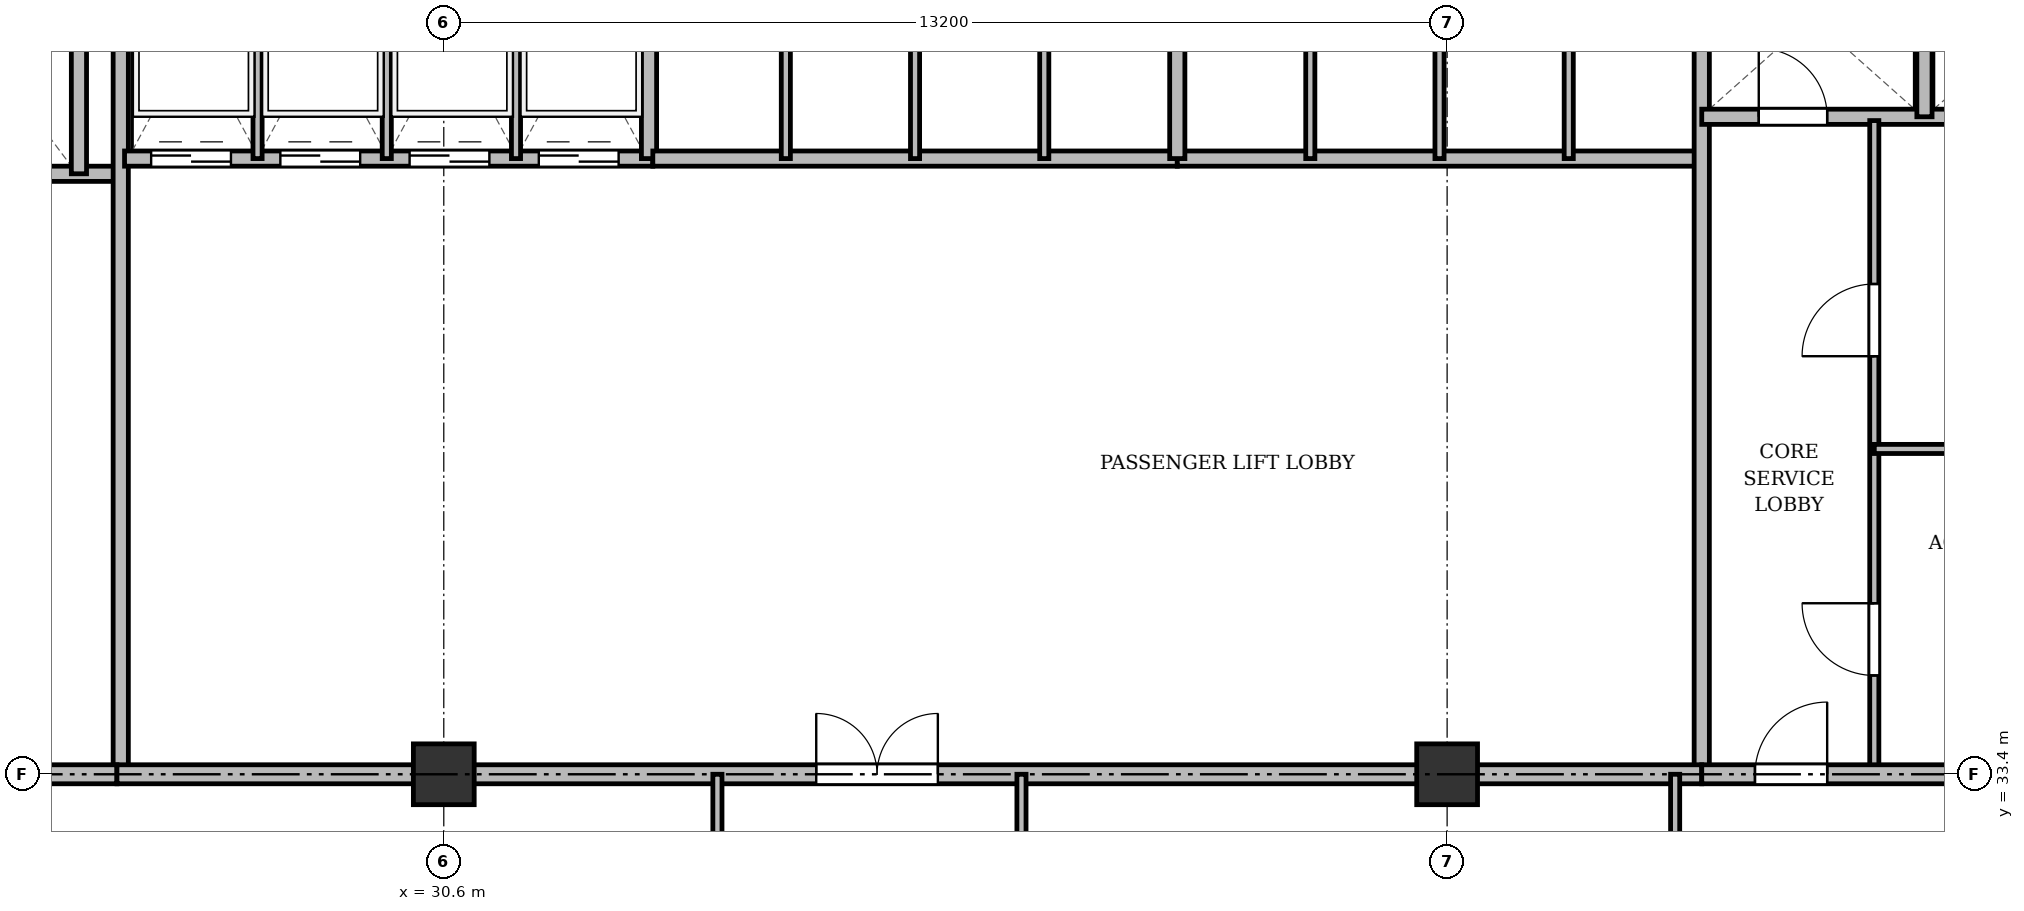
"""IFC4 building model, lengths in metres.
Left out: names, types, materials, properties, quantities, classifications, styles, units other than length and angle.
Written with IfcOpenShell. Run it as: python <this file> out.ifc"""

import sys

from ifc_helpers import new_model, si_unit, direction, frame, frame_2d, origin, origin_2d, place, context, subcontext, project, spatial, rectangle, extrude, source, transform, mapped, element, fill, save


model = new_model("IFC4")
c1 = context("Model", 3, precision=1e-05, world=origin(), true_north=direction((0.0, 1.0)))
c2 = subcontext(c1, "Body", "Model", "MODEL_VIEW")
j1 = project(units=[si_unit("LENGTHUNIT", "METRE"), si_unit("PLANEANGLEUNIT", "RADIAN")], contexts=[c1])
p1 = place(None, origin())
s1 = spatial("IfcSite", under=j1, at=p1, CompositionType="ELEMENT")
p2 = place(p1, origin())
s2 = spatial("IfcBuilding", under=s1, at=p2, CompositionType="ELEMENT")
p3 = place(p2, frame((0.0, 0.0, 103.3)))
s3 = spatial("IfcBuildingStorey", under=s2, at=p3, CompositionType="ELEMENT", Elevation=103.3)
m1 = source(origin(), c2, "Body", "SweptSolid", [
    extrude(rectangle(XDim=0.8, YDim=0.8, at=origin_2d()), origin(), (0.0, 0.0, 1.0), 3.6),
])
for number, where, z_axis, x_axis in (
    (1, (30.6, 33.4, 0.0), (0.0, 0.0, 1.0), (1.0, 0.0, 0.0)),
    (2, (43.8, 33.4, 0.0), (0.0, 0.0, 1.0), (1.0, 0.0, 0.0)),
):
    element("IfcColumn", number, at=place(p3, frame(where, z_axis=z_axis, x_axis=x_axis)), inside=s3, PredefinedType="COLUMN", context=c2, shape_type="MappedRepresentation", body=[
        mapped(m1, transform((0.0, 0.0, 0.0), x_axis=(1.0, 0.0, 0.0), y_axis=(0.0, 1.0, 0.0), z_axis=(0.0, 0.0, 1.0), scale=1.0)),
    ])
p4 = place(p3, frame((19.55, 41.3, 0.0), z_axis=(0.0, 0.0, 1.0), x_axis=(1.0, 0.0, 0.0)))
e3 = element("IfcWall", 3, at=p4, inside=s3, PredefinedType="SOLIDWALL", context=c2, shape_type="SweptSolid", body=[
    extrude(rectangle(XDim=6.75, YDim=0.2, at=frame_2d((3.375, 0.0))), origin(), (0.0, 0.0, 1.0), 3.34),
])
p5 = place(p4, frame((1.7, 0.0, 0.0)))
e4 = element("IfcOpeningElement", 4, at=p5, cuts=e3, PredefinedType="OPENING", context=c2, shape_type="SweptSolid", body=[
    extrude(rectangle(XDim=1.1, YDim=2.15, at=frame_2d((0.55, 1.075))), frame((0.0, 0.11, 0.0), z_axis=(0.0, -1.0, 0.0), x_axis=(1.0, 0.0, 0.0)), (0.0, 0.0, 1.0), 0.22),
])
p6 = place(p4, frame((4.4, 0.0, 0.0)))
e5 = element("IfcOpeningElement", 5, at=p6, cuts=e3, PredefinedType="OPENING", context=c2, shape_type="SweptSolid", body=[
    extrude(rectangle(XDim=1.1, YDim=2.15, at=frame_2d((0.55, 1.075))), frame((0.0, 0.11, 0.0), z_axis=(0.0, -1.0, 0.0), x_axis=(1.0, 0.0, 0.0)), (0.0, 0.0, 1.0), 0.22),
])
p7 = place(p3, frame((25.8, 41.3, 0.0), z_axis=(0.0, 0.0, 1.0), x_axis=(0.0, 1.0, 0.0)))
e6 = element("IfcWall", 6, at=p7, inside=s3, PredefinedType="SOLIDWALL", context=c2, shape_type="SweptSolid", body=[
    extrude(rectangle(XDim=3.4, YDim=0.2, at=frame_2d((1.7, 0.0))), origin(), (0.0, 0.0, 1.0), 3.34),
])
p8 = place(p3, frame((26.35, 33.4, 0.0), z_axis=(0.0, 0.0, 1.0), x_axis=(0.0, 1.0, 0.0)))
e7 = element("IfcWall", 7, at=p8, inside=s3, PredefinedType="SOLIDWALL", context=c2, shape_type="SweptSolid", body=[
    extrude(rectangle(XDim=11.3, YDim=0.2, at=frame_2d((5.65, 0.0))), origin(), (0.0, 0.0, 1.0), 2.752),
])
p9 = place(p3, frame((19.5, 33.4, 0.0), z_axis=(0.0, 0.0, 1.0), x_axis=(1.0, 0.0, 0.0)))
e8 = element("IfcWall", 8, at=p9, inside=s3, PredefinedType="PARTITIONING", context=c2, shape_type="SweptSolid", body=[
    extrude(rectangle(XDim=6.8, YDim=0.25, at=frame_2d((3.4, 0.0))), origin(), (0.0, 0.0, 1.0), 2.752),
])
p10 = place(p9, frame((0.75, 0.0, 0.0)))
e9 = element("IfcOpeningElement", 9, at=p10, cuts=e8, PredefinedType="OPENING", context=c2, shape_type="SweptSolid", body=[
    extrude(rectangle(XDim=1.6, YDim=2.2, at=frame_2d((0.8, 1.1))), frame((0.0, 0.135, 0.0), z_axis=(0.0, -1.0, 0.0), x_axis=(1.0, 0.0, 0.0)), (0.0, 0.0, 1.0), 0.27),
])
p11 = place(p3, frame((26.4, 41.5, 0.0), z_axis=(0.0, 0.0, 1.0), x_axis=(1.0, 0.0, 0.0)))
e10 = element("IfcWall", 10, at=p11, inside=s3, PredefinedType="SOLIDWALL", context=c2, shape_type="SweptSolid", body=[
    extrude(rectangle(XDim=6.95, YDim=0.2, at=frame_2d((3.475, 0.0))), origin(), (0.0, 0.0, 1.0), 3.34),
])
p12 = place(p11, frame((0.35, 0.0, 0.0)))
e11 = element("IfcOpeningElement", 11, at=p12, cuts=e10, PredefinedType="OPENING", context=c2, shape_type="SweptSolid", body=[
    extrude(rectangle(XDim=1.05, YDim=2.15, at=frame_2d((0.525, 1.075))), frame((0.0, 0.11, 0.0), z_axis=(0.0, -1.0, 0.0), x_axis=(1.0, 0.0, 0.0)), (0.0, 0.0, 1.0), 0.22),
])
p13 = place(p11, frame((2.05, 0.0, 0.0)))
e12 = element("IfcOpeningElement", 12, at=p13, cuts=e10, PredefinedType="OPENING", context=c2, shape_type="SweptSolid", body=[
    extrude(rectangle(XDim=1.05, YDim=2.15, at=frame_2d((0.525, 1.075))), frame((0.0, 0.11, 0.0), z_axis=(0.0, -1.0, 0.0), x_axis=(1.0, 0.0, 0.0)), (0.0, 0.0, 1.0), 0.22),
])
p14 = place(p11, frame((3.75, 0.0, 0.0)))
e13 = element("IfcOpeningElement", 13, at=p14, cuts=e10, PredefinedType="OPENING", context=c2, shape_type="SweptSolid", body=[
    extrude(rectangle(XDim=1.05, YDim=2.15, at=frame_2d((0.525, 1.075))), frame((0.0, 0.11, 0.0), z_axis=(0.0, -1.0, 0.0), x_axis=(1.0, 0.0, 0.0)), (0.0, 0.0, 1.0), 0.22),
])
p15 = place(p11, frame((5.45, 0.0, 0.0)))
e14 = element("IfcOpeningElement", 14, at=p15, cuts=e10, PredefinedType="OPENING", context=c2, shape_type="SweptSolid", body=[
    extrude(rectangle(XDim=1.05, YDim=2.15, at=frame_2d((0.525, 1.075))), frame((0.0, 0.11, 0.0), z_axis=(0.0, -1.0, 0.0), x_axis=(1.0, 0.0, 0.0)), (0.0, 0.0, 1.0), 0.22),
])
p16 = place(p3, frame((33.3, 41.5, 0.0), z_axis=(0.0, 0.0, 1.0), x_axis=(0.0, 1.0, 0.0)))
e15 = element("IfcWall", 15, at=p16, inside=s3, PredefinedType="SOLIDWALL", context=c2, shape_type="SweptSolid", body=[
    extrude(rectangle(XDim=3.2, YDim=0.2, at=frame_2d((1.6, 0.0))), origin(), (0.0, 0.0, 1.0), 3.34),
])
for number, where, z_axis, x_axis in (
    (16, (28.15, 41.5, 0.0), (0.0, 0.0, 1.0), (0.0, 1.0, 0.0)),
    (17, (29.85, 41.5, 0.0), (0.0, 0.0, 1.0), (0.0, 1.0, 0.0)),
    (18, (31.55, 41.5, 0.0), (0.0, 0.0, 1.0), (0.0, 1.0, 0.0)),
):
    element("IfcWall", number, at=place(p3, frame(where, z_axis=z_axis, x_axis=x_axis)), inside=s3, PredefinedType="PARTITIONING", context=c2, shape_type="SweptSolid", body=[
        extrude(rectangle(XDim=3.2, YDim=0.12, at=frame_2d((1.6, 0.0))), origin(), (0.0, 0.0, 1.0), 3.34),
    ])
p17 = place(p3, frame((33.35, 41.5, 0.0), z_axis=(0.0, 0.0, 1.0), x_axis=(1.0, 0.0, 0.0)))
e19 = element("IfcWall", 19, at=p17, inside=s3, PredefinedType="SOLIDWALL", context=c2, shape_type="SweptSolid", body=[
    extrude(rectangle(XDim=6.9, YDim=0.2, at=frame_2d((3.45, 0.0))), origin(), (0.0, 0.0, 1.0), 3.34),
])
for number, where, z_axis, x_axis in (
    (20, (35.1, 41.5, 0.0), (0.0, 0.0, 1.0), (0.0, 1.0, 0.0)),
    (21, (36.8, 41.5, 0.0), (0.0, 0.0, 1.0), (0.0, 1.0, 0.0)),
    (22, (38.5, 41.5, 0.0), (0.0, 0.0, 1.0), (0.0, 1.0, 0.0)),
):
    element("IfcWall", number, at=place(p3, frame(where, z_axis=z_axis, x_axis=x_axis)), inside=s3, PredefinedType="PARTITIONING", context=c2, shape_type="SweptSolid", body=[
        extrude(rectangle(XDim=3.2, YDim=0.12, at=frame_2d((1.6, 0.0))), origin(), (0.0, 0.0, 1.0), 3.34),
    ])
p18 = place(p3, frame((40.25, 41.5, 0.0), z_axis=(0.0, 0.0, 1.0), x_axis=(1.0, 0.0, 0.0)))
e23 = element("IfcWall", 23, at=p18, inside=s3, PredefinedType="SOLIDWALL", context=c2, shape_type="SweptSolid", body=[
    extrude(rectangle(XDim=6.9, YDim=0.2, at=frame_2d((3.45, 0.0))), origin(), (0.0, 0.0, 1.0), 2.84),
])
p19 = place(p3, frame((40.25, 41.5, 0.0), z_axis=(0.0, 0.0, 1.0), x_axis=(0.0, 1.0, 0.0)))
e24 = element("IfcWall", 24, at=p19, inside=s3, PredefinedType="SOLIDWALL", context=c2, shape_type="SweptSolid", body=[
    extrude(rectangle(XDim=3.2, YDim=0.2, at=frame_2d((1.6, 0.0))), origin(), (0.0, 0.0, 1.0), 3.34),
])
p20 = place(p3, frame((42.0, 41.5, 0.0), z_axis=(0.0, 0.0, 1.0), x_axis=(0.0, 1.0, 0.0)))
e25 = element("IfcWall", 25, at=p20, inside=s3, PredefinedType="PARTITIONING", context=c2, shape_type="SweptSolid", body=[
    extrude(rectangle(XDim=3.2, YDim=0.12, at=frame_2d((1.6, 0.0))), origin(), (0.0, 0.0, 1.0), 3.34),
])
p21 = place(p3, frame((43.7, 41.5, 0.0), z_axis=(0.0, 0.0, 1.0), x_axis=(0.0, 1.0, 0.0)))
e26 = element("IfcWall", 26, at=p21, inside=s3, PredefinedType="PARTITIONING", context=c2, shape_type="SweptSolid", body=[
    extrude(rectangle(XDim=3.2, YDim=0.12, at=frame_2d((1.6, 0.0))), origin(), (0.0, 0.0, 1.0), 2.84),
])
p22 = place(p3, frame((45.4, 41.5, 0.0), z_axis=(0.0, 0.0, 1.0), x_axis=(0.0, 1.0, 0.0)))
e27 = element("IfcWall", 27, at=p22, inside=s3, PredefinedType="PARTITIONING", context=c2, shape_type="SweptSolid", body=[
    extrude(rectangle(XDim=3.2, YDim=0.12, at=frame_2d((1.6, 0.0))), origin(), (0.0, 0.0, 1.0), 3.34),
])
p23 = place(p3, frame((47.15, 33.4, 0.0), z_axis=(0.0, 0.0, 1.0), x_axis=(0.0, 1.0, 0.0)))
e28 = element("IfcWall", 28, at=p23, inside=s3, PredefinedType="SOLIDWALL", context=c2, shape_type="SweptSolid", body=[
    extrude(rectangle(XDim=11.3, YDim=0.2, at=frame_2d((5.65, 0.0))), origin(), (0.0, 0.0, 1.0), 2.752),
])
p24 = place(p3, frame((26.3, 33.4, 0.0), z_axis=(0.0, 0.0, 1.0), x_axis=(1.0, 0.0, 0.0)))
e29 = element("IfcWall", 29, at=p24, inside=s3, PredefinedType="PARTITIONING", context=c2, shape_type="SweptSolid", body=[
    extrude(rectangle(XDim=20.85, YDim=0.25, at=frame_2d((10.425, 0.0))), origin(), (0.0, 0.0, 1.0), 2.752),
])
p25 = place(p24, frame((9.2, 0.0, 0.0)))
e30 = element("IfcOpeningElement", 30, at=p25, cuts=e29, PredefinedType="OPENING", context=c2, shape_type="SweptSolid", body=[
    extrude(rectangle(XDim=1.6, YDim=2.2, at=frame_2d((0.8, 1.1))), frame((0.0, 0.135, 0.0), z_axis=(0.0, -1.0, 0.0), x_axis=(1.0, 0.0, 0.0)), (0.0, 0.0, 1.0), 0.27),
])
p26 = place(p3, frame((47.15, 42.05, 0.0), z_axis=(0.0, 0.0, 1.0), x_axis=(1.0, 0.0, 0.0)))
e31 = element("IfcWall", 31, at=p26, inside=s3, PredefinedType="SOLIDWALL", context=c2, shape_type="SweptSolid", body=[
    extrude(rectangle(XDim=7.85, YDim=0.2, at=frame_2d((3.925, 0.0))), origin(), (0.0, 0.0, 1.0), 2.84),
])
p27 = place(p26, frame((0.75, 0.0, 0.0)))
e32 = element("IfcOpeningElement", 32, at=p27, cuts=e31, PredefinedType="OPENING", context=c2, shape_type="SweptSolid", body=[
    extrude(rectangle(XDim=0.9, YDim=2.1, at=frame_2d((0.45, 1.05))), frame((0.0, 0.11, 0.0), z_axis=(0.0, -1.0, 0.0), x_axis=(1.0, 0.0, 0.0)), (0.0, 0.0, 1.0), 0.22),
])
p28 = place(p26, frame((3.85, 0.0, 0.0)))
e33 = element("IfcOpeningElement", 33, at=p28, cuts=e31, PredefinedType="OPENING", context=c2, shape_type="SweptSolid", body=[
    extrude(rectangle(XDim=0.9, YDim=2.1, at=frame_2d((0.45, 1.05))), frame((0.0, 0.11, 0.0), z_axis=(0.0, -1.0, 0.0), x_axis=(1.0, 0.0, 0.0)), (0.0, 0.0, 1.0), 0.22),
])
p29 = place(p3, frame((50.08, 42.05, 0.0), z_axis=(0.0, 0.0, 1.0), x_axis=(0.0, 1.0, 0.0)))
e34 = element("IfcWall", 34, at=p29, inside=s3, PredefinedType="SOLIDWALL", context=c2, shape_type="SweptSolid", body=[
    extrude(rectangle(XDim=2.65, YDim=0.2, at=frame_2d((1.325, 0.0))), origin(), (0.0, 0.0, 1.0), 3.34),
])
p30 = place(p3, frame((49.42, 33.4, 0.0), z_axis=(0.0, 0.0, 1.0), x_axis=(0.0, 1.0, 0.0)))
e35 = element("IfcWall", 35, at=p30, inside=s3, PredefinedType="PARTITIONING", context=c2, shape_type="SweptSolid", body=[
    extrude(rectangle(XDim=8.6, YDim=0.12, at=frame_2d((4.3, 0.0))), origin(), (0.0, 0.0, 1.0), 2.752),
])
p31 = place(p30, frame((1.3, 0.0, 0.0)))
e36 = element("IfcOpeningElement", 36, at=p31, cuts=e35, PredefinedType="OPENING", context=c2, shape_type="SweptSolid", body=[
    extrude(rectangle(XDim=0.95, YDim=2.15, at=frame_2d((0.475, 1.075))), frame((0.0, 0.07, 0.0), z_axis=(0.0, -1.0, 0.0), x_axis=(1.0, 0.0, 0.0)), (0.0, 0.0, 1.0), 0.14),
])
p32 = place(p30, frame((5.5, 0.0, 0.0)))
e37 = element("IfcOpeningElement", 37, at=p32, cuts=e35, PredefinedType="OPENING", context=c2, shape_type="SweptSolid", body=[
    extrude(rectangle(XDim=0.95, YDim=2.15, at=frame_2d((0.475, 1.075))), frame((0.0, 0.07, 0.0), z_axis=(0.0, -1.0, 0.0), x_axis=(1.0, 0.0, 0.0)), (0.0, 0.0, 1.0), 0.14),
])
p33 = place(p3, frame((49.42, 37.68, 0.0), z_axis=(0.0, 0.0, 1.0), x_axis=(1.0, 0.0, 0.0)))
e38 = element("IfcWall", 38, at=p33, inside=s3, PredefinedType="PARTITIONING", context=c2, shape_type="SweptSolid", body=[
    extrude(rectangle(XDim=3.03, YDim=0.12, at=frame_2d((1.515, 0.0))), origin(), (0.0, 0.0, 1.0), 2.84),
])
p34 = place(p3, frame((47.15, 33.4, 0.0), z_axis=(0.0, 0.0, 1.0), x_axis=(1.0, 0.0, 0.0)))
e39 = element("IfcWall", 39, at=p34, inside=s3, PredefinedType="PARTITIONING", context=c2, shape_type="SweptSolid", body=[
    extrude(rectangle(XDim=11.15, YDim=0.25, at=frame_2d((5.575, 0.0))), origin(), (0.0, 0.0, 1.0), 2.752),
])
p35 = place(p34, frame((0.7, 0.0, 0.0)))
e40 = element("IfcOpeningElement", 40, at=p35, cuts=e39, PredefinedType="OPENING", context=c2, shape_type="SweptSolid", body=[
    extrude(rectangle(XDim=0.95, YDim=2.15, at=frame_2d((0.475, 1.075))), frame((0.0, 0.135, 0.0), z_axis=(0.0, -1.0, 0.0), x_axis=(1.0, 0.0, 0.0)), (0.0, 0.0, 1.0), 0.27),
])
p36 = place(p34, frame((6.0, 0.0, 0.0)))
e41 = element("IfcOpeningElement", 41, at=p36, cuts=e39, PredefinedType="OPENING", context=c2, shape_type="SweptSolid", body=[
    extrude(rectangle(XDim=1.2, YDim=2.15, at=frame_2d((0.6, 1.075))), frame((0.0, 0.135, 0.0), z_axis=(0.0, -1.0, 0.0), x_axis=(1.0, 0.0, 0.0)), (0.0, 0.0, 1.0), 0.27),
])
for number, where, z_axis, x_axis in (
    (42, (34.2, 29.8, 0.0), (0.0, 0.0, 1.0), (0.0, 1.0, 0.0)),
    (43, (38.2, 29.8, 0.0), (0.0, 0.0, 1.0), (0.0, 1.0, 0.0)),
    (44, (46.8, 29.8, 0.0), (0.0, 0.0, 1.0), (0.0, 1.0, 0.0)),
):
    element("IfcWall", number, at=place(p3, frame(where, z_axis=z_axis, x_axis=x_axis)), inside=s3, PredefinedType="PARTITIONING", context=c2, shape_type="SweptSolid", body=[
        extrude(rectangle(XDim=3.6, YDim=0.12, at=frame_2d((1.8, 0.0))), origin(), (0.0, 0.0, 1.0), 2.752),
    ])
m2 = source(origin(), c2, "Body", "SweptSolid", [
    extrude(rectangle(XDim=1.05, YDim=2.15, at=frame_2d((0.525, 1.075))), frame((0.0, 0.025, 0.0), z_axis=(0.0, -1.0, 0.0), x_axis=(1.0, 0.0, 0.0)), (0.0, 0.0, 1.0), 0.05),
])
p37 = place(p12, origin())
e45 = element("IfcDoor", 45, at=p37, inside=s3, OperationType="DOUBLE_DOOR_SLIDING", PredefinedType="DOOR", context=c2, shape_type="MappedRepresentation", body=[
    mapped(m2, transform((0.0, 0.0, 0.0), x_axis=(1.0, 0.0, 0.0), y_axis=(0.0, 1.0, 0.0), z_axis=(0.0, 0.0, 1.0), scale=1.0)),
])
fill(e11, e45)
p38 = place(p13, origin())
e46 = element("IfcDoor", 46, at=p38, inside=s3, OperationType="DOUBLE_DOOR_SLIDING", PredefinedType="DOOR", context=c2, shape_type="MappedRepresentation", body=[
    mapped(m2, transform((0.0, 0.0, 0.0), x_axis=(1.0, 0.0, 0.0), y_axis=(0.0, 1.0, 0.0), z_axis=(0.0, 0.0, 1.0), scale=1.0)),
])
fill(e12, e46)
p39 = place(p14, origin())
e47 = element("IfcDoor", 47, at=p39, inside=s3, OperationType="DOUBLE_DOOR_SLIDING", PredefinedType="DOOR", context=c2, shape_type="MappedRepresentation", body=[
    mapped(m2, transform((0.0, 0.0, 0.0), x_axis=(1.0, 0.0, 0.0), y_axis=(0.0, 1.0, 0.0), z_axis=(0.0, 0.0, 1.0), scale=1.0)),
])
fill(e13, e47)
p40 = place(p15, origin())
e48 = element("IfcDoor", 48, at=p40, inside=s3, OperationType="DOUBLE_DOOR_SLIDING", PredefinedType="DOOR", context=c2, shape_type="MappedRepresentation", body=[
    mapped(m2, transform((0.0, 0.0, 0.0), x_axis=(1.0, 0.0, 0.0), y_axis=(0.0, 1.0, 0.0), z_axis=(0.0, 0.0, 1.0), scale=1.0)),
])
fill(e14, e48)
m3 = source(origin(), c2, "Body", "SweptSolid", [
    extrude(rectangle(XDim=1.6, YDim=2.2, at=frame_2d((0.8, 1.1))), frame((0.0, 0.025, 0.0), z_axis=(0.0, -1.0, 0.0), x_axis=(1.0, 0.0, 0.0)), (0.0, 0.0, 1.0), 0.05),
])
p41 = place(p25, origin())
e49 = element("IfcDoor", 49, at=p41, inside=s3, OperationType="DOUBLE_DOOR_SINGLE_SWING", PredefinedType="DOOR", context=c2, shape_type="MappedRepresentation", body=[
    mapped(m3, transform((0.0, 0.0, 0.0), x_axis=(1.0, 0.0, 0.0), y_axis=(0.0, 1.0, 0.0), z_axis=(0.0, 0.0, 1.0), scale=1.0)),
])
fill(e30, e49)
m4 = source(origin(), c2, "Body", "SweptSolid", [
    extrude(rectangle(XDim=0.9, YDim=2.1, at=frame_2d((0.45, 1.05))), frame((0.0, 0.025, 0.0), z_axis=(0.0, -1.0, 0.0), x_axis=(1.0, 0.0, 0.0)), (0.0, 0.0, 1.0), 0.05),
])
p42 = place(p27, origin())
e50 = element("IfcDoor", 50, at=p42, inside=s3, OperationType="SINGLE_SWING_LEFT", PredefinedType="DOOR", context=c2, shape_type="MappedRepresentation", body=[
    mapped(m4, transform((0.0, 0.0, 0.0), x_axis=(1.0, 0.0, 0.0), y_axis=(0.0, 1.0, 0.0), z_axis=(0.0, 0.0, 1.0), scale=1.0)),
])
fill(e32, e50)
m5 = source(origin(), c2, "Body", "SweptSolid", [
    extrude(rectangle(XDim=0.95, YDim=2.15, at=frame_2d((0.475, 1.075))), frame((0.0, 0.025, 0.0), z_axis=(0.0, -1.0, 0.0), x_axis=(1.0, 0.0, 0.0)), (0.0, 0.0, 1.0), 0.05),
])
p43 = place(p31, origin())
e51 = element("IfcDoor", 51, at=p43, inside=s3, OperationType="SINGLE_SWING_RIGHT", PredefinedType="DOOR", context=c2, shape_type="MappedRepresentation", body=[
    mapped(m5, transform((0.0, 0.0, 0.0), x_axis=(1.0, 0.0, 0.0), y_axis=(0.0, 1.0, 0.0), z_axis=(0.0, 0.0, 1.0), scale=1.0)),
])
fill(e36, e51)
p44 = place(p32, origin())
e52 = element("IfcDoor", 52, at=p44, inside=s3, OperationType="SINGLE_SWING_LEFT", PredefinedType="DOOR", context=c2, shape_type="MappedRepresentation", body=[
    mapped(m5, transform((0.0, 0.0, 0.0), x_axis=(1.0, 0.0, 0.0), y_axis=(0.0, 1.0, 0.0), z_axis=(0.0, 0.0, 1.0), scale=1.0)),
])
fill(e37, e52)
p45 = place(p35, origin())
e53 = element("IfcDoor", 53, at=p45, inside=s3, OperationType="SINGLE_SWING_RIGHT", PredefinedType="DOOR", context=c2, shape_type="MappedRepresentation", body=[
    mapped(m5, transform((0.0, 0.0, 0.0), x_axis=(1.0, 0.0, 0.0), y_axis=(0.0, 1.0, 0.0), z_axis=(0.0, 0.0, 1.0), scale=1.0)),
])
fill(e40, e53)
save(model, sys.argv[1])
